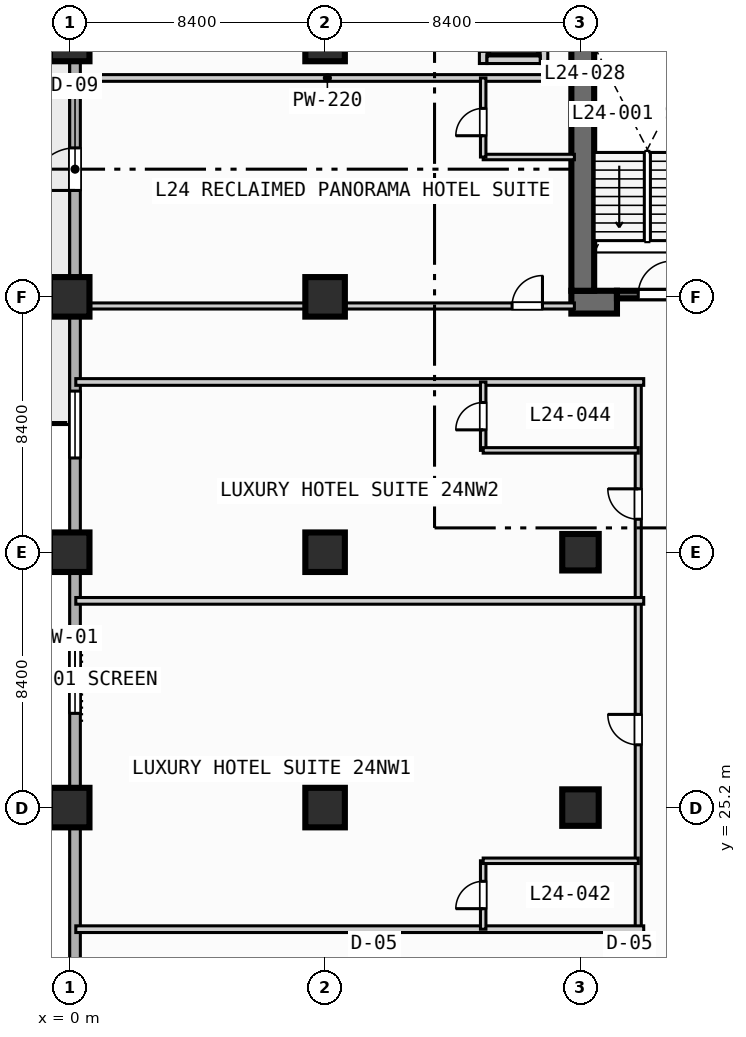
"""IFC4 building model, lengths in metres.
Left out: names, types, materials, properties, quantities, classifications, styles, units other than length and angle.
Written with IfcOpenShell. Run it as: python <this file> out.ifc"""

import sys

from ifc_helpers import new_model, si_unit, direction, frame, frame_2d, origin, origin_2d, place, context, subcontext, project, spatial, rectangle, extrude, element, fill, save


model = new_model("IFC4")
c1 = context("Model", 3, precision=1e-05, world=origin(), true_north=direction((0.0, 1.0)))
c2 = subcontext(c1, "Body", "Model", "MODEL_VIEW")
j1 = project(units=[si_unit("LENGTHUNIT", "METRE"), si_unit("PLANEANGLEUNIT", "RADIAN")], contexts=[c1])
p1 = place(None, origin())
s1 = spatial("IfcSite", under=j1, at=p1, CompositionType="ELEMENT")
p2 = place(p1, origin())
s2 = spatial("IfcBuilding", under=s1, at=p2, CompositionType="ELEMENT")
p3 = place(p2, frame((0.0, 0.0, 103.8)))
s3 = spatial("IfcBuildingStorey", under=s2, at=p3, CompositionType="ELEMENT", Elevation=103.8)
p4 = place(p3, frame((16.5, 41.825, 0.0), z_axis=(0.0, 0.0, 1.0), x_axis=(1.0, 0.0, 0.0)))
e1 = element("IfcWall", 1, at=p4, inside=s3, PredefinedType="SHEAR", context=c2, shape_type="SweptSolid", body=[
    extrude(rectangle(XDim=1.5, YDim=0.75, at=frame_2d((0.75, 0.0))), origin(), (0.0, 0.0, 1.0), 3.55),
])
p5 = place(p3, frame((16.875, 42.2, 0.0), z_axis=(0.0, 0.0, 1.0), x_axis=(0.0, 1.0, 0.0)))
e2 = element("IfcWall", 2, at=p5, inside=s3, PredefinedType="SHEAR", context=c2, shape_type="SweptSolid", body=[
    extrude(rectangle(XDim=16.35, YDim=0.75, at=frame_2d((8.175, 0.0))), origin(), (0.0, 0.0, 1.0), 3.55),
])
for number, where, z_axis, x_axis in (
    (3, (0.0, 25.2, 0.0), (0.0, 0.0, 1.0), (1.0, 0.0, 0.0)),
    (4, (0.0, 33.6, 0.0), (0.0, 0.0, 1.0), (1.0, 0.0, 0.0)),
    (5, (0.0, 42.0, 0.0), (0.0, 0.0, 1.0), (1.0, 0.0, 0.0)),
    (6, (0.0, 50.4, 0.0), (0.0, 0.0, 1.0), (1.0, 0.0, 0.0)),
    (7, (8.4, 25.2, 0.0), (0.0, 0.0, 1.0), (1.0, 0.0, 0.0)),
    (8, (8.4, 33.6, 0.0), (0.0, 0.0, 1.0), (1.0, 0.0, 0.0)),
    (9, (8.4, 42.0, 0.0), (0.0, 0.0, 1.0), (1.0, 0.0, 0.0)),
    (10, (8.4, 50.4, 0.0), (0.0, 0.0, 1.0), (1.0, 0.0, 0.0)),
):
    element("IfcColumn", number, at=place(p3, frame(where, z_axis=z_axis, x_axis=x_axis)), inside=s3, PredefinedType="COLUMN", context=c2, shape_type="SweptSolid", body=[
        extrude(rectangle(XDim=1.3, YDim=1.3, at=origin_2d()), origin(), (0.0, 0.0, 1.0), 3.8),
    ])
for number, where, z_axis, x_axis in (
    (11, (16.8, 25.2, 0.0), (0.0, 0.0, 1.0), (1.0, 0.0, 0.0)),
    (12, (16.8, 33.6, 0.0), (0.0, 0.0, 1.0), (1.0, 0.0, 0.0)),
):
    element("IfcColumn", number, at=place(p3, frame(where, z_axis=z_axis, x_axis=x_axis)), inside=s3, PredefinedType="COLUMN", context=c2, shape_type="SweptSolid", body=[
        extrude(rectangle(XDim=1.2, YDim=1.2, at=origin_2d()), origin(), (0.0, 0.0, 1.0), 3.8),
    ])
p6 = place(p3, frame((0.175, 3.175, 0.0), z_axis=(0.0, 0.0, 1.0), x_axis=(0.0, 1.0, 0.0)))
e13 = element("IfcWall", 13, at=p6, inside=s3, PredefinedType="STANDARD", context=c2, shape_type="SweptSolid", body=[
    extrude(rectangle(XDim=86.05, YDim=0.35, at=frame_2d((43.025, 0.0))), origin(), (0.0, 0.0, 1.0), 3.55),
])
p7 = place(p6, frame((42.325, 0.0, 0.0)))
e14 = element("IfcOpeningElement", 14, at=p7, cuts=e13, PredefinedType="OPENING", context=c2, shape_type="SweptSolid", body=[
    extrude(rectangle(XDim=1.4, YDim=2.2, at=frame_2d((0.7, 1.1))), frame((0.0, 0.185, 0.0), z_axis=(0.0, -1.0, 0.0), x_axis=(1.0, 0.0, 0.0)), (0.0, 0.0, 1.0), 0.37),
])
p8 = place(p6, frame((25.125, 0.0, 0.85)))
e15 = element("IfcOpeningElement", 15, at=p8, cuts=e13, PredefinedType="OPENING", context=c2, shape_type="SweptSolid", body=[
    extrude(rectangle(XDim=2.2, YDim=1.8, at=frame_2d((1.1, 0.9))), frame((0.0, 0.185, 0.0), z_axis=(0.0, -1.0, 0.0), x_axis=(1.0, 0.0, 0.0)), (0.0, 0.0, 1.0), 0.37),
])
p9 = place(p6, frame((33.525, 0.0, 0.85)))
e16 = element("IfcOpeningElement", 16, at=p9, cuts=e13, PredefinedType="OPENING", context=c2, shape_type="SweptSolid", body=[
    extrude(rectangle(XDim=2.2, YDim=1.8, at=frame_2d((1.1, 0.9))), frame((0.0, 0.185, 0.0), z_axis=(0.0, -1.0, 0.0), x_axis=(1.0, 0.0, 0.0)), (0.0, 0.0, 1.0), 0.37),
])
p10 = place(p6, frame((58.725, 0.0, 0.85)))
e17 = element("IfcOpeningElement", 17, at=p10, cuts=e13, PredefinedType="OPENING", context=c2, shape_type="SweptSolid", body=[
    extrude(rectangle(XDim=2.2, YDim=1.8, at=frame_2d((1.1, 0.9))), frame((0.0, 0.185, 0.0), z_axis=(0.0, -1.0, 0.0), x_axis=(1.0, 0.0, 0.0)), (0.0, 0.0, 1.0), 0.37),
])
p11 = place(p6, frame((65.125, 0.0, 0.85)))
e18 = element("IfcOpeningElement", 18, at=p11, cuts=e13, PredefinedType="OPENING", context=c2, shape_type="SweptSolid", body=[
    extrude(rectangle(XDim=1.8, YDim=1.8, at=frame_2d((0.9, 0.9))), frame((0.0, 0.185, 0.0), z_axis=(0.0, -1.0, 0.0), x_axis=(1.0, 0.0, 0.0)), (0.0, 0.0, 1.0), 0.37),
])
p12 = place(p6, frame((73.275, 0.0, 0.85)))
e19 = element("IfcOpeningElement", 19, at=p12, cuts=e13, PredefinedType="OPENING", context=c2, shape_type="SweptSolid", body=[
    extrude(rectangle(XDim=1.8, YDim=1.8, at=frame_2d((0.9, 0.9))), frame((0.0, 0.185, 0.0), z_axis=(0.0, -1.0, 0.0), x_axis=(1.0, 0.0, 0.0)), (0.0, 0.0, 1.0), 0.37),
])
p13 = place(p6, frame((81.625, 0.0, 0.85)))
e20 = element("IfcOpeningElement", 20, at=p13, cuts=e13, PredefinedType="OPENING", context=c2, shape_type="SweptSolid", body=[
    extrude(rectangle(XDim=1.8, YDim=1.8, at=frame_2d((0.9, 0.9))), frame((0.0, 0.185, 0.0), z_axis=(0.0, -1.0, 0.0), x_axis=(1.0, 0.0, 0.0)), (0.0, 0.0, 1.0), 0.37),
])
p14 = place(p3, frame((18.0, 42.075, 0.0), z_axis=(0.0, 0.0, 1.0), x_axis=(1.0, 0.0, 0.0)))
e21 = element("IfcWall", 21, at=p14, inside=s3, PredefinedType="SOLIDWALL", context=c2, shape_type="SweptSolid", body=[
    extrude(rectangle(XDim=2.5, YDim=0.25, at=frame_2d((1.25, 0.0))), origin(), (0.0, 0.0, 1.0), 3.55),
])
p15 = place(p14, frame((0.7, 0.0, 0.0)))
e22 = element("IfcOpeningElement", 22, at=p15, cuts=e21, PredefinedType="OPENING", context=c2, shape_type="SweptSolid", body=[
    extrude(rectangle(XDim=1.1, YDim=2.15, at=frame_2d((0.55, 1.075))), frame((0.0, 0.135, 0.0), z_axis=(0.0, -1.0, 0.0), x_axis=(1.0, 0.0, 0.0)), (0.0, 0.0, 1.0), 0.27),
])
p16 = place(p3, frame((13.6, 49.675, 0.0), z_axis=(0.0, 0.0, 1.0), x_axis=(0.0, 1.0, 0.0)))
e23 = element("IfcWall", 23, at=p16, inside=s3, PredefinedType="SOLIDWALL", context=c2, shape_type="SweptSolid", body=[
    extrude(rectangle(XDim=2.75, YDim=0.25, at=frame_2d((1.375, 0.0))), origin(), (0.0, 0.0, 1.0), 3.55),
])
p17 = place(p16, frame((0.4, 0.0, 0.0)))
e24 = element("IfcOpeningElement", 24, at=p17, cuts=e23, PredefinedType="OPENING", context=c2, shape_type="SweptSolid", body=[
    extrude(rectangle(XDim=1.1, YDim=2.15, at=frame_2d((0.55, 1.075))), frame((0.0, 0.135, 0.0), z_axis=(0.0, -1.0, 0.0), x_axis=(1.0, 0.0, 0.0)), (0.0, 0.0, 1.0), 0.27),
])
p18 = place(p3, frame((15.6, 49.675, 0.0), z_axis=(0.0, 0.0, 1.0), x_axis=(0.0, 1.0, 0.0)))
e25 = element("IfcWall", 25, at=p18, inside=s3, PredefinedType="SOLIDWALL", context=c2, shape_type="SweptSolid", body=[
    extrude(rectangle(XDim=2.75, YDim=0.25, at=frame_2d((1.375, 0.0))), origin(), (0.0, 0.0, 1.0), 3.55),
])
p19 = place(p3, frame((13.725, 49.8, 0.0), z_axis=(0.0, 0.0, 1.0), x_axis=(1.0, 0.0, 0.0)))
e26 = element("IfcWall", 26, at=p19, inside=s3, PredefinedType="SOLIDWALL", context=c2, shape_type="SweptSolid", body=[
    extrude(rectangle(XDim=1.75, YDim=0.25, at=frame_2d((0.875, 0.0))), origin(), (0.0, 0.0, 1.0), 3.55),
])
p20 = place(p3, frame((0.35, 41.7, 0.0), z_axis=(0.0, 0.0, 1.0), x_axis=(1.0, 0.0, 0.0)))
e27 = element("IfcWall", 27, at=p20, inside=s3, PredefinedType="PARTITIONING", context=c2, shape_type="SweptSolid", body=[
    extrude(rectangle(XDim=16.25, YDim=0.2, at=frame_2d((8.125, 0.0))), origin(), (0.0, 0.0, 1.0), 2.8),
])
p21 = place(p20, frame((14.2, 0.0, 0.0)))
e28 = element("IfcOpeningElement", 28, at=p21, cuts=e27, PredefinedType="OPENING", context=c2, shape_type="SweptSolid", body=[
    extrude(rectangle(XDim=1.0, YDim=2.15, at=frame_2d((0.5, 1.075))), frame((0.0, 0.11, 0.0), z_axis=(0.0, -1.0, 0.0), x_axis=(1.0, 0.0, 0.0)), (0.0, 0.0, 1.0), 0.22),
])
p22 = place(p3, frame((0.35, 49.2, 0.0), z_axis=(0.0, 0.0, 1.0), x_axis=(1.0, 0.0, 0.0)))
e29 = element("IfcWall", 29, at=p22, inside=s3, PredefinedType="PARTITIONING", context=c2, shape_type="SweptSolid", body=[
    extrude(rectangle(XDim=16.25, YDim=0.22, at=frame_2d((8.125, 0.0))), origin(), (0.0, 0.0, 1.0), 3.55),
])
p23 = place(p3, frame((13.6, 46.6, 0.0), z_axis=(0.0, 0.0, 1.0), x_axis=(1.0, 0.0, 0.0)))
e30 = element("IfcWall", 30, at=p23, inside=s3, PredefinedType="PLUMBINGWALL", context=c2, shape_type="SweptSolid", body=[
    extrude(rectangle(XDim=3.0, YDim=0.18, at=frame_2d((1.5, 0.0))), origin(), (0.0, 0.0, 1.0), 3.55),
])
p24 = place(p3, frame((13.6, 46.6, 0.0), z_axis=(0.0, 0.0, 1.0), x_axis=(0.0, 1.0, 0.0)))
e31 = element("IfcWall", 31, at=p24, inside=s3, PredefinedType="PLUMBINGWALL", context=c2, shape_type="SweptSolid", body=[
    extrude(rectangle(XDim=2.6, YDim=0.18, at=frame_2d((1.3, 0.0))), origin(), (0.0, 0.0, 1.0), 3.55),
])
p25 = place(p24, frame((0.7, 0.0, 0.0)))
e32 = element("IfcOpeningElement", 32, at=p25, cuts=e31, PredefinedType="OPENING", context=c2, shape_type="SweptSolid", body=[
    extrude(rectangle(XDim=0.9, YDim=2.1, at=frame_2d((0.45, 1.05))), frame((0.0, 0.1, 0.0), z_axis=(0.0, -1.0, 0.0), x_axis=(1.0, 0.0, 0.0)), (0.0, 0.0, 1.0), 0.2),
])
p26 = place(p3, frame((18.7, 21.2, 0.0), z_axis=(0.0, 0.0, 1.0), x_axis=(0.0, 1.0, 0.0)))
e33 = element("IfcWall", 33, at=p26, inside=s3, PredefinedType="PARTITIONING", context=c2, shape_type="SweptSolid", body=[
    extrude(rectangle(XDim=18.0, YDim=0.2, at=frame_2d((9.0, 0.0))), origin(), (0.0, 0.0, 1.0), 3.55),
])
p27 = place(p26, frame((6.065, 0.0, 0.0)))
e34 = element("IfcOpeningElement", 34, at=p27, cuts=e33, PredefinedType="OPENING", context=c2, shape_type="SweptSolid", body=[
    extrude(rectangle(XDim=1.0, YDim=2.15, at=frame_2d((0.5, 1.075))), frame((0.0, 0.11, 0.0), z_axis=(0.0, -1.0, 0.0), x_axis=(1.0, 0.0, 0.0)), (0.0, 0.0, 1.0), 0.22),
])
p28 = place(p26, frame((13.485, 0.0, 0.0)))
e35 = element("IfcOpeningElement", 35, at=p28, cuts=e33, PredefinedType="OPENING", context=c2, shape_type="SweptSolid", body=[
    extrude(rectangle(XDim=1.0, YDim=2.15, at=frame_2d((0.5, 1.075))), frame((0.0, 0.11, 0.0), z_axis=(0.0, -1.0, 0.0), x_axis=(1.0, 0.0, 0.0)), (0.0, 0.0, 1.0), 0.22),
])
p29 = place(p3, frame((0.2, 21.2, 0.0), z_axis=(0.0, 0.0, 1.0), x_axis=(1.0, 0.0, 0.0)))
e36 = element("IfcWall", 36, at=p29, inside=s3, PredefinedType="PARTITIONING", context=c2, shape_type="SweptSolid", body=[
    extrude(rectangle(XDim=18.68, YDim=0.22, at=frame_2d((9.34, 0.0))), origin(), (0.0, 0.0, 1.0), 3.55),
])
p30 = place(p3, frame((13.6, 21.2, 0.0), z_axis=(0.0, 0.0, 1.0), x_axis=(0.0, 1.0, 0.0)))
e37 = element("IfcWall", 37, at=p30, inside=s3, PredefinedType="PLUMBINGWALL", context=c2, shape_type="SweptSolid", body=[
    extrude(rectangle(XDim=2.25, YDim=0.18, at=frame_2d((1.125, 0.0))), origin(), (0.0, 0.0, 1.0), 3.55),
])
p31 = place(p30, frame((0.675, 0.0, 0.0)))
e38 = element("IfcOpeningElement", 38, at=p31, cuts=e37, PredefinedType="OPENING", context=c2, shape_type="SweptSolid", body=[
    extrude(rectangle(XDim=0.9, YDim=2.1, at=frame_2d((0.45, 1.05))), frame((0.0, 0.1, 0.0), z_axis=(0.0, -1.0, 0.0), x_axis=(1.0, 0.0, 0.0)), (0.0, 0.0, 1.0), 0.2),
])
p32 = place(p3, frame((13.6, 23.45, 0.0), z_axis=(0.0, 0.0, 1.0), x_axis=(1.0, 0.0, 0.0)))
e39 = element("IfcWall", 39, at=p32, inside=s3, PredefinedType="PLUMBINGWALL", context=c2, shape_type="SweptSolid", body=[
    extrude(rectangle(XDim=5.1, YDim=0.18, at=frame_2d((2.55, 0.0))), origin(), (0.0, 0.0, 1.0), 3.55),
])
for number, where, z_axis, x_axis in (
    (40, (0.2, 32.0, 0.0), (0.0, 0.0, 1.0), (1.0, 0.0, 0.0)),
    (41, (0.2, 39.2, 0.0), (0.0, 0.0, 1.0), (1.0, 0.0, 0.0)),
):
    element("IfcWall", number, at=place(p3, frame(where, z_axis=z_axis, x_axis=x_axis)), inside=s3, PredefinedType="PARTITIONING", context=c2, shape_type="SweptSolid", body=[
        extrude(rectangle(XDim=18.68, YDim=0.22, at=frame_2d((9.34, 0.0))), origin(), (0.0, 0.0, 1.0), 3.55),
    ])
p33 = place(p3, frame((13.6, 36.95, 0.0), z_axis=(0.0, 0.0, 1.0), x_axis=(0.0, 1.0, 0.0)))
e42 = element("IfcWall", 42, at=p33, inside=s3, PredefinedType="PLUMBINGWALL", context=c2, shape_type="SweptSolid", body=[
    extrude(rectangle(XDim=2.25, YDim=0.18, at=frame_2d((1.125, 0.0))), origin(), (0.0, 0.0, 1.0), 3.55),
])
p34 = place(p33, frame((0.675, 0.0, 0.0)))
e43 = element("IfcOpeningElement", 43, at=p34, cuts=e42, PredefinedType="OPENING", context=c2, shape_type="SweptSolid", body=[
    extrude(rectangle(XDim=0.9, YDim=2.1, at=frame_2d((0.45, 1.05))), frame((0.0, 0.1, 0.0), z_axis=(0.0, -1.0, 0.0), x_axis=(1.0, 0.0, 0.0)), (0.0, 0.0, 1.0), 0.2),
])
p35 = place(p3, frame((13.6, 36.95, 0.0), z_axis=(0.0, 0.0, 1.0), x_axis=(1.0, 0.0, 0.0)))
e44 = element("IfcWall", 44, at=p35, inside=s3, PredefinedType="PLUMBINGWALL", context=c2, shape_type="SweptSolid", body=[
    extrude(rectangle(XDim=5.1, YDim=0.18, at=frame_2d((2.55, 0.0))), origin(), (0.0, 0.0, 1.0), 3.55),
])
p36 = place(p7, origin())
e45 = element("IfcDoor", 45, at=p36, inside=s3, OperationType="SINGLE_SWING_LEFT", PredefinedType="DOOR", context=c2, shape_type="SweptSolid", body=[
    extrude(rectangle(XDim=1.4, YDim=2.2, at=frame_2d((0.7, 1.1))), frame((0.0, 0.025, 0.0), z_axis=(0.0, -1.0, 0.0), x_axis=(1.0, 0.0, 0.0)), (0.0, 0.0, 1.0), 0.05),
])
fill(e14, e45)
p37 = place(p8, origin())
e46 = element("IfcWindow", 46, at=p37, inside=s3, PartitioningType="SINGLE_PANEL", PredefinedType="WINDOW", context=c2, shape_type="SweptSolid", body=[
    extrude(rectangle(XDim=2.2, YDim=1.8, at=frame_2d((1.1, 0.9))), frame((0.0, 0.03, 0.0), z_axis=(0.0, -1.0, 0.0), x_axis=(1.0, 0.0, 0.0)), (0.0, 0.0, 1.0), 0.06),
])
fill(e15, e46)
p38 = place(p9, origin())
e47 = element("IfcWindow", 47, at=p38, inside=s3, PartitioningType="SINGLE_PANEL", PredefinedType="WINDOW", context=c2, shape_type="SweptSolid", body=[
    extrude(rectangle(XDim=2.2, YDim=1.8, at=frame_2d((1.1, 0.9))), frame((0.0, 0.03, 0.0), z_axis=(0.0, -1.0, 0.0), x_axis=(1.0, 0.0, 0.0)), (0.0, 0.0, 1.0), 0.06),
])
fill(e16, e47)
p39 = place(p15, origin())
e48 = element("IfcDoor", 48, at=p39, inside=s3, OperationType="SINGLE_SWING_RIGHT", PredefinedType="DOOR", context=c2, shape_type="SweptSolid", body=[
    extrude(rectangle(XDim=1.1, YDim=2.15, at=frame_2d((0.55, 1.075))), frame((0.0, 0.025, 0.0), z_axis=(0.0, -1.0, 0.0), x_axis=(1.0, 0.0, 0.0)), (0.0, 0.0, 1.0), 0.05),
])
fill(e22, e48)
p40 = place(p21, origin())
e49 = element("IfcDoor", 49, at=p40, inside=s3, OperationType="SINGLE_SWING_RIGHT", PredefinedType="DOOR", context=c2, shape_type="SweptSolid", body=[
    extrude(rectangle(XDim=1.0, YDim=2.15, at=frame_2d((0.5, 1.075))), frame((0.0, 0.025, 0.0), z_axis=(0.0, -1.0, 0.0), x_axis=(1.0, 0.0, 0.0)), (0.0, 0.0, 1.0), 0.05),
])
fill(e28, e49)
p41 = place(p25, origin())
e50 = element("IfcDoor", 50, at=p41, inside=s3, OperationType="SINGLE_SWING_LEFT", PredefinedType="DOOR", context=c2, shape_type="SweptSolid", body=[
    extrude(rectangle(XDim=0.9, YDim=2.1, at=frame_2d((0.45, 1.05))), frame((0.0, 0.025, 0.0), z_axis=(0.0, -1.0, 0.0), x_axis=(1.0, 0.0, 0.0)), (0.0, 0.0, 1.0), 0.05),
])
fill(e32, e50)
p42 = place(p27, origin())
e51 = element("IfcDoor", 51, at=p42, inside=s3, OperationType="SINGLE_SWING_RIGHT", PredefinedType="DOOR", context=c2, shape_type="SweptSolid", body=[
    extrude(rectangle(XDim=1.0, YDim=2.15, at=frame_2d((0.5, 1.075))), frame((0.0, 0.025, 0.0), z_axis=(0.0, -1.0, 0.0), x_axis=(1.0, 0.0, 0.0)), (0.0, 0.0, 1.0), 0.05),
])
fill(e34, e51)
p43 = place(p28, origin())
e52 = element("IfcDoor", 52, at=p43, inside=s3, OperationType="SINGLE_SWING_RIGHT", PredefinedType="DOOR", context=c2, shape_type="SweptSolid", body=[
    extrude(rectangle(XDim=1.0, YDim=2.15, at=frame_2d((0.5, 1.075))), frame((0.0, 0.025, 0.0), z_axis=(0.0, -1.0, 0.0), x_axis=(1.0, 0.0, 0.0)), (0.0, 0.0, 1.0), 0.05),
])
fill(e35, e52)
p44 = place(p31, origin())
e53 = element("IfcDoor", 53, at=p44, inside=s3, OperationType="SINGLE_SWING_LEFT", PredefinedType="DOOR", context=c2, shape_type="SweptSolid", body=[
    extrude(rectangle(XDim=0.9, YDim=2.1, at=frame_2d((0.45, 1.05))), frame((0.0, 0.025, 0.0), z_axis=(0.0, -1.0, 0.0), x_axis=(1.0, 0.0, 0.0)), (0.0, 0.0, 1.0), 0.05),
])
fill(e38, e53)
p45 = place(p34, origin())
e54 = element("IfcDoor", 54, at=p45, inside=s3, OperationType="SINGLE_SWING_LEFT", PredefinedType="DOOR", context=c2, shape_type="SweptSolid", body=[
    extrude(rectangle(XDim=0.9, YDim=2.1, at=frame_2d((0.45, 1.05))), frame((0.0, 0.025, 0.0), z_axis=(0.0, -1.0, 0.0), x_axis=(1.0, 0.0, 0.0)), (0.0, 0.0, 1.0), 0.05),
])
fill(e43, e54)
save(model, sys.argv[1])
